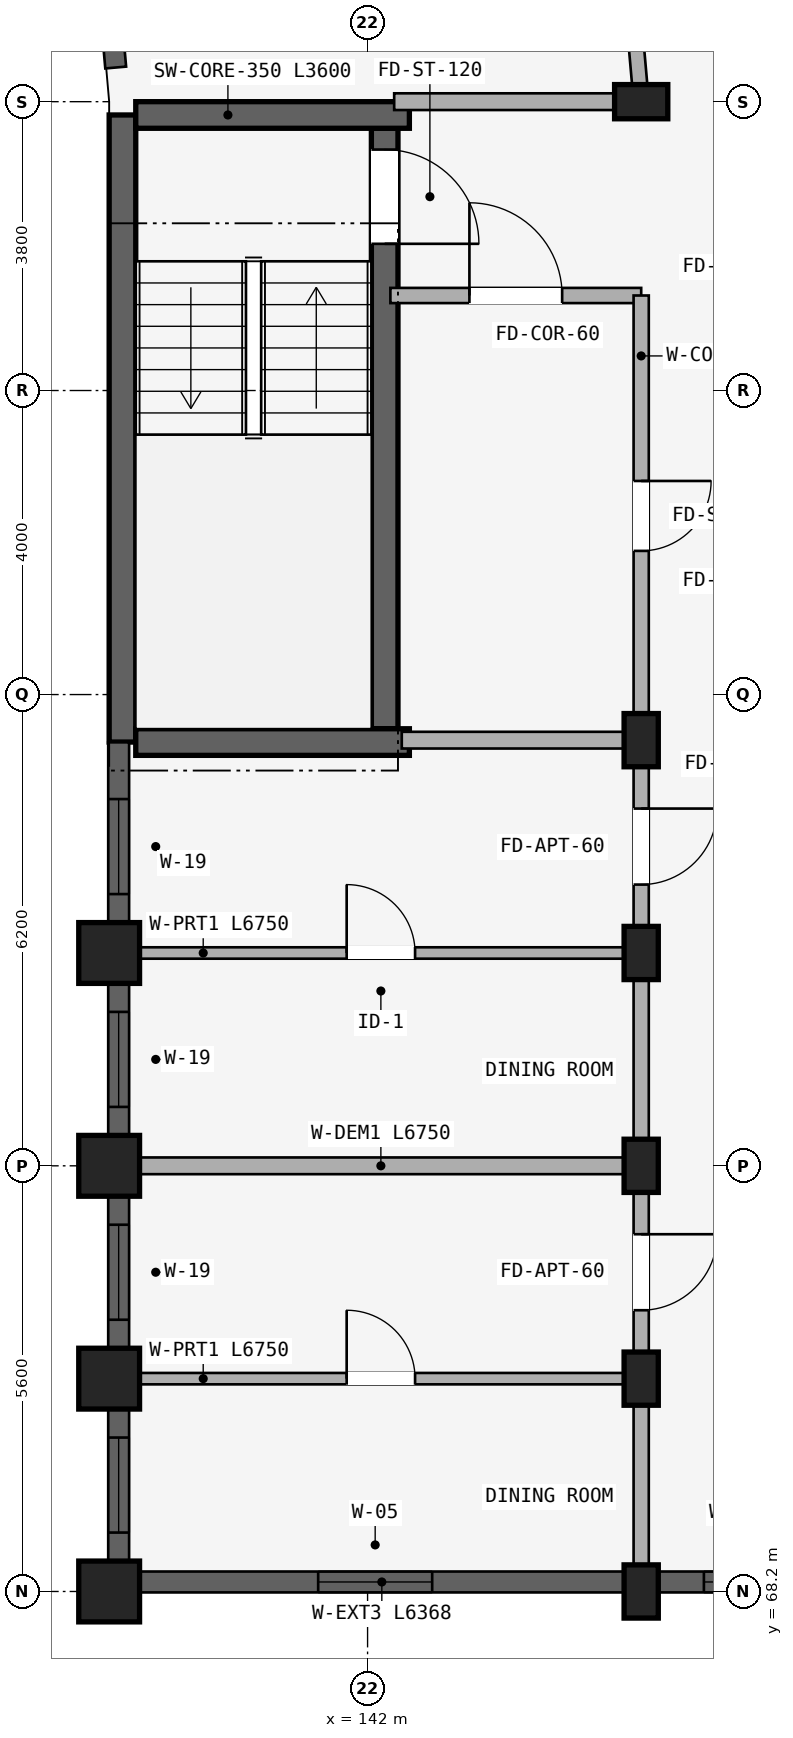
"""IFC4 building model, lengths in metres.
Left out: names, types, materials, properties, quantities, classifications, styles, units other than length and angle.
Written with IfcOpenShell. Run it as: python <this file> out.ifc"""

import sys

from ifc_helpers import new_model, si_unit, direction, frame, frame_2d, origin, origin_2d, place, context, subcontext, project, spatial, rectangle, extrude, element, fill, save


model = new_model("IFC4")
c1 = context("Model", 3, precision=1e-05, world=origin(), true_north=direction((0.0, 1.0)))
c2 = subcontext(c1, "Body", "Model", "MODEL_VIEW")
j1 = project(units=[si_unit("LENGTHUNIT", "METRE"), si_unit("PLANEANGLEUNIT", "RADIAN")], contexts=[c1])
p1 = place(None, origin())
s1 = spatial("IfcSite", under=j1, at=p1, CompositionType="ELEMENT")
p2 = place(p1, origin())
s2 = spatial("IfcBuilding", under=s1, at=p2, CompositionType="ELEMENT")
p3 = place(p2, frame((0.0, 0.0, 11.85)))
s3 = spatial("IfcBuildingStorey", under=s2, at=p3, CompositionType="ELEMENT", Elevation=11.85)
p4 = place(p3, frame((138.775, 87.625, 0.0), z_axis=(0.0, 0.0, 1.0), x_axis=(0.0, -1.0, 0.0)))
e1 = element("IfcWall", 1, at=p4, inside=s3, PredefinedType="SHEAR", context=c2, shape_type="SweptSolid", body=[
    extrude(rectangle(XDim=8.25, YDim=0.35, at=frame_2d((4.125, 0.0))), origin(), (0.0, 0.0, 1.0), 2.93),
])
p5 = place(p3, frame((142.225, 87.45, 0.0), z_axis=(0.0, 0.0, 1.0), x_axis=(0.0, -1.0, 0.0)))
e2 = element("IfcWall", 2, at=p5, inside=s3, PredefinedType="SHEAR", context=c2, shape_type="SweptSolid", body=[
    extrude(rectangle(XDim=7.9, YDim=0.35, at=frame_2d((3.95, 0.0))), origin(), (0.0, 0.0, 1.0), 2.93),
])
p6 = place(p5, frame((0.28, 0.0, 0.0)))
e3 = element("IfcOpeningElement", 3, at=p6, cuts=e2, PredefinedType="OPENING", context=c2, shape_type="SweptSolid", body=[
    extrude(rectangle(XDim=1.24, YDim=2.15, at=frame_2d((0.62, 1.075))), frame((0.0, 0.185, 0.0), z_axis=(0.0, -1.0, 0.0), x_axis=(1.0, 0.0, 0.0)), (0.0, 0.0, 1.0), 0.37),
])
for number, where, z_axis, x_axis in (
    (4, (138.95, 87.625, 0.0), (0.0, 0.0, 1.0), (1.0, 0.0, 0.0)),
    (5, (138.95, 79.375, 0.0), (0.0, 0.0, 1.0), (1.0, 0.0, 0.0)),
):
    element("IfcWall", number, at=place(p3, frame(where, z_axis=z_axis, x_axis=x_axis)), inside=s3, PredefinedType="SHEAR", context=c2, shape_type="SweptSolid", body=[
        extrude(rectangle(XDim=3.6, YDim=0.35, at=frame_2d((1.8, 0.0))), origin(), (0.0, 0.0, 1.0), 2.93),
    ])
for number, where, z_axis, x_axis in (
    (6, (145.6, 87.8, 0.0), (0.0, 0.0, 1.0), (0.0, 1.0, 0.0)),
    (7, (145.6, 79.4, 0.0), (0.0, 0.0, 1.0), (1.0, 0.0, 0.0)),
):
    element("IfcColumn", number, at=place(p3, frame(where, z_axis=z_axis, x_axis=x_axis)), inside=s3, PredefinedType="COLUMN", context=c2, shape_type="SweptSolid", body=[
        extrude(rectangle(XDim=0.45, YDim=0.7, at=origin_2d()), origin(), (0.0, 0.0, 1.0), 2.93),
    ])
p7 = place(p3, frame((138.6, 76.6, 0.0), z_axis=(0.0, 0.0, 1.0), x_axis=(1.0, 0.0, 0.0)))
e8 = element("IfcColumn", 8, at=p7, inside=s3, PredefinedType="COLUMN", context=c2, shape_type="SweptSolid", body=[
    extrude(rectangle(XDim=0.8, YDim=0.8, at=origin_2d()), origin(), (0.0, 0.0, 1.0), 2.93),
])
p8 = place(p3, frame((145.6, 76.6, 0.0), z_axis=(0.0, 0.0, 1.0), x_axis=(1.0, 0.0, 0.0)))
e9 = element("IfcColumn", 9, at=p8, inside=s3, PredefinedType="COLUMN", context=c2, shape_type="SweptSolid", body=[
    extrude(rectangle(XDim=0.45, YDim=0.7, at=origin_2d()), origin(), (0.0, 0.0, 1.0), 2.93),
])
p9 = place(p3, frame((138.6, 73.8, 0.0), z_axis=(0.0, 0.0, 1.0), x_axis=(1.0, 0.0, 0.0)))
e10 = element("IfcColumn", 10, at=p9, inside=s3, PredefinedType="COLUMN", context=c2, shape_type="SweptSolid", body=[
    extrude(rectangle(XDim=0.8, YDim=0.8, at=origin_2d()), origin(), (0.0, 0.0, 1.0), 2.93),
])
p10 = place(p3, frame((145.6, 73.8, 0.0), z_axis=(0.0, 0.0, 1.0), x_axis=(1.0, 0.0, 0.0)))
e11 = element("IfcColumn", 11, at=p10, inside=s3, PredefinedType="COLUMN", context=c2, shape_type="SweptSolid", body=[
    extrude(rectangle(XDim=0.45, YDim=0.7, at=origin_2d()), origin(), (0.0, 0.0, 1.0), 2.93),
])
p11 = place(p3, frame((138.6, 71.0, 0.0), z_axis=(0.0, 0.0, 1.0), x_axis=(1.0, 0.0, 0.0)))
e12 = element("IfcColumn", 12, at=p11, inside=s3, PredefinedType="COLUMN", context=c2, shape_type="SweptSolid", body=[
    extrude(rectangle(XDim=0.8, YDim=0.8, at=origin_2d()), origin(), (0.0, 0.0, 1.0), 2.93),
])
p12 = place(p3, frame((145.6, 71.0, 0.0), z_axis=(0.0, 0.0, 1.0), x_axis=(1.0, 0.0, 0.0)))
e13 = element("IfcColumn", 13, at=p12, inside=s3, PredefinedType="COLUMN", context=c2, shape_type="SweptSolid", body=[
    extrude(rectangle(XDim=0.45, YDim=0.7, at=origin_2d()), origin(), (0.0, 0.0, 1.0), 2.93),
])
p13 = place(p3, frame((138.6, 68.2, 0.0), z_axis=(0.0, 0.0, 1.0), x_axis=(1.0, 0.0, 0.0)))
e14 = element("IfcColumn", 14, at=p13, inside=s3, PredefinedType="COLUMN", context=c2, shape_type="SweptSolid", body=[
    extrude(rectangle(XDim=0.8, YDim=0.8, at=origin_2d()), origin(), (0.0, 0.0, 1.0), 2.93),
])
p14 = place(p3, frame((145.6, 68.2, 0.0), z_axis=(0.0, 0.0, 1.0), x_axis=(1.0, 0.0, 0.0)))
e15 = element("IfcColumn", 15, at=p14, inside=s3, PredefinedType="COLUMN", context=c2, shape_type="SweptSolid", body=[
    extrude(rectangle(XDim=0.45, YDim=0.7, at=origin_2d()), origin(), (0.0, 0.0, 1.0), 2.93),
])
p15 = place(p3, frame((142.3, 85.25, 0.0), z_axis=(0.0, 0.0, 1.0), x_axis=(1.0, 0.0, 0.0)))
e16 = element("IfcWall", 16, at=p15, inside=s3, PredefinedType="STANDARD", context=c2, shape_type="SweptSolid", body=[
    extrude(rectangle(XDim=3.3, YDim=0.2, at=frame_2d((1.65, 0.0))), origin(), (0.0, 0.0, 1.0), 2.372),
])
p16 = place(p15, frame((1.04, 0.0, 0.0)))
e17 = element("IfcOpeningElement", 17, at=p16, cuts=e16, PredefinedType="OPENING", context=c2, shape_type="SweptSolid", body=[
    extrude(rectangle(XDim=1.22, YDim=2.15, at=frame_2d((0.61, 1.075))), frame((0.0, 0.11, 0.0), z_axis=(0.0, -1.0, 0.0), x_axis=(1.0, 0.0, 0.0)), (0.0, 0.0, 1.0), 0.22),
])
p17 = place(p3, frame((145.6, 85.25, 0.0), z_axis=(0.0, 0.0, 1.0), x_axis=(0.0, -1.0, 0.0)))
e18 = element("IfcWall", 18, at=p17, inside=s3, PredefinedType="STANDARD", context=c2, shape_type="SweptSolid", body=[
    extrude(rectangle(XDim=5.8, YDim=0.2, at=frame_2d((2.9, 0.0))), origin(), (0.0, 0.0, 1.0), 2.372),
])
p18 = place(p17, frame((2.44, 0.0, 0.0)))
e19 = element("IfcOpeningElement", 19, at=p18, cuts=e18, PredefinedType="OPENING", context=c2, shape_type="SweptSolid", body=[
    extrude(rectangle(XDim=0.92, YDim=2.1, at=frame_2d((0.46, 1.05))), frame((0.0, 0.11, 0.0), z_axis=(0.0, -1.0, 0.0), x_axis=(1.0, 0.0, 0.0)), (0.0, 0.0, 1.0), 0.22),
])
p19 = place(p3, frame((145.208, 92.28, 0.0), z_axis=(0.0, 0.0, 1.0), x_axis=(0.087187153726, -0.996191949488, 0.0)))
e20 = element("IfcWall", 20, at=p19, inside=s3, PredefinedType="STANDARD", context=c2, shape_type="SweptSolid", body=[
    extrude(rectangle(XDim=4.497, YDim=0.2, at=frame_2d((2.249, 0.0))), origin(), (0.0, 0.0, 1.0), 2.372),
])
p20 = place(p3, frame((142.35, 87.8, 0.0), z_axis=(0.0, 0.0, 1.0), x_axis=(1.0, 0.0, 0.0)))
e21 = element("IfcWall", 21, at=p20, inside=s3, PredefinedType="STANDARD", context=c2, shape_type="SweptSolid", body=[
    extrude(rectangle(XDim=3.2, YDim=0.22, at=frame_2d((1.6, 0.0))), origin(), (0.0, 0.0, 1.0), 2.372),
])
p21 = place(p3, frame((145.6, 79.4, 0.0), z_axis=(0.0, 0.0, 1.0), x_axis=(0.0, -1.0, 0.0)))
e22 = element("IfcWall", 22, at=p21, inside=s3, PredefinedType="STANDARD", context=c2, shape_type="SweptSolid", body=[
    extrude(rectangle(XDim=2.8, YDim=0.2, at=frame_2d((1.4, 0.0))), origin(), (0.0, 0.0, 1.0), 2.372),
])
p22 = place(p21, frame((0.9, 0.0, 0.0)))
e23 = element("IfcOpeningElement", 23, at=p22, cuts=e22, PredefinedType="OPENING", context=c2, shape_type="SweptSolid", body=[
    extrude(rectangle(XDim=1.0, YDim=2.15, at=frame_2d((0.5, 1.075))), frame((0.0, 0.11, 0.0), z_axis=(0.0, -1.0, 0.0), x_axis=(1.0, 0.0, 0.0)), (0.0, 0.0, 1.0), 0.22),
])
p23 = place(p3, frame((142.45, 79.4, 0.0), z_axis=(0.0, 0.0, 1.0), x_axis=(1.0, 0.0, 0.0)))
e24 = element("IfcWall", 24, at=p23, inside=s3, PredefinedType="STANDARD", context=c2, shape_type="SweptSolid", body=[
    extrude(rectangle(XDim=3.1, YDim=0.22, at=frame_2d((1.55, 0.0))), origin(), (0.0, 0.0, 1.0), 2.372),
])
p24 = place(p3, frame((145.6, 76.6, 0.0), z_axis=(0.0, 0.0, 1.0), x_axis=(0.0, -1.0, 0.0)))
e25 = element("IfcWall", 25, at=p24, inside=s3, PredefinedType="STANDARD", context=c2, shape_type="SweptSolid", body=[
    extrude(rectangle(XDim=2.8, YDim=0.2, at=frame_2d((1.4, 0.0))), origin(), (0.0, 0.0, 1.0), 2.372),
])
p25 = place(p3, frame((138.8, 76.6, 0.0), z_axis=(0.0, 0.0, 1.0), x_axis=(1.0, 0.0, 0.0)))
e26 = element("IfcWall", 26, at=p25, inside=s3, PredefinedType="PARTITIONING", context=c2, shape_type="SweptSolid", body=[
    extrude(rectangle(XDim=6.75, YDim=0.15, at=frame_2d((3.375, 0.0))), origin(), (0.0, 0.0, 1.0), 2.372),
])
p26 = place(p25, frame((2.925, 0.0, 0.0)))
e27 = element("IfcOpeningElement", 27, at=p26, cuts=e26, PredefinedType="OPENING", context=c2, shape_type="SweptSolid", body=[
    extrude(rectangle(XDim=0.9, YDim=2.1, at=frame_2d((0.45, 1.05))), frame((0.0, 0.085, 0.0), z_axis=(0.0, -1.0, 0.0), x_axis=(1.0, 0.0, 0.0)), (0.0, 0.0, 1.0), 0.17),
])
p27 = place(p3, frame((145.6, 73.8, 0.0), z_axis=(0.0, 0.0, 1.0), x_axis=(0.0, -1.0, 0.0)))
e28 = element("IfcWall", 28, at=p27, inside=s3, PredefinedType="STANDARD", context=c2, shape_type="SweptSolid", body=[
    extrude(rectangle(XDim=2.8, YDim=0.2, at=frame_2d((1.4, 0.0))), origin(), (0.0, 0.0, 1.0), 2.372),
])
p28 = place(p27, frame((0.9, 0.0, 0.0)))
e29 = element("IfcOpeningElement", 29, at=p28, cuts=e28, PredefinedType="OPENING", context=c2, shape_type="SweptSolid", body=[
    extrude(rectangle(XDim=1.0, YDim=2.15, at=frame_2d((0.5, 1.075))), frame((0.0, 0.11, 0.0), z_axis=(0.0, -1.0, 0.0), x_axis=(1.0, 0.0, 0.0)), (0.0, 0.0, 1.0), 0.22),
])
p29 = place(p3, frame((138.8, 73.8, 0.0), z_axis=(0.0, 0.0, 1.0), x_axis=(1.0, 0.0, 0.0)))
e30 = element("IfcWall", 30, at=p29, inside=s3, PredefinedType="STANDARD", context=c2, shape_type="SweptSolid", body=[
    extrude(rectangle(XDim=6.75, YDim=0.22, at=frame_2d((3.375, 0.0))), origin(), (0.0, 0.0, 1.0), 2.372),
])
p30 = place(p3, frame((145.6, 71.0, 0.0), z_axis=(0.0, 0.0, 1.0), x_axis=(0.0, -1.0, 0.0)))
e31 = element("IfcWall", 31, at=p30, inside=s3, PredefinedType="STANDARD", context=c2, shape_type="SweptSolid", body=[
    extrude(rectangle(XDim=2.8, YDim=0.2, at=frame_2d((1.4, 0.0))), origin(), (0.0, 0.0, 1.0), 2.372),
])
p31 = place(p3, frame((138.8, 71.0, 0.0), z_axis=(0.0, 0.0, 1.0), x_axis=(1.0, 0.0, 0.0)))
e32 = element("IfcWall", 32, at=p31, inside=s3, PredefinedType="PARTITIONING", context=c2, shape_type="SweptSolid", body=[
    extrude(rectangle(XDim=6.75, YDim=0.15, at=frame_2d((3.375, 0.0))), origin(), (0.0, 0.0, 1.0), 2.372),
])
p32 = place(p31, frame((2.925, 0.0, 0.0)))
e33 = element("IfcOpeningElement", 33, at=p32, cuts=e32, PredefinedType="OPENING", context=c2, shape_type="SweptSolid", body=[
    extrude(rectangle(XDim=0.9, YDim=2.1, at=frame_2d((0.45, 1.05))), frame((0.0, 0.085, 0.0), z_axis=(0.0, -1.0, 0.0), x_axis=(1.0, 0.0, 0.0)), (0.0, 0.0, 1.0), 0.17),
])
p33 = place(p3, frame((138.463, 90.797, 0.0), z_axis=(0.0, 0.0, 1.0), x_axis=(0.08716102895, -0.996194235595, 0.0)))
e34 = element("IfcWall", 34, at=p33, inside=s3, PredefinedType="STANDARD", context=c2, shape_type="SweptSolid", body=[
    extrude(rectangle(XDim=2.557, YDim=0.275, at=frame_2d((1.279, 0.0))), origin(), (0.0, 0.0, 1.0), 2.422),
])
p34 = place(p33, frame((0.759, 0.0, 0.722)))
e35 = element("IfcOpeningElement", 35, at=p34, cuts=e34, PredefinedType="OPENING", context=c2, shape_type="SweptSolid", body=[
    extrude(rectangle(XDim=1.2, YDim=1.5, at=frame_2d((0.6, 0.75))), frame((0.0, 0.147, 0.0), z_axis=(0.0, -1.0, 0.0), x_axis=(1.0, 0.0, 0.0)), (0.0, 0.0, 1.0), 0.295),
])
p35 = place(p3, frame((138.725, 79.372, 0.0), z_axis=(0.0, 0.0, 1.0), x_axis=(0.0, -1.0, 0.0)))
e36 = element("IfcWall", 36, at=p35, inside=s3, PredefinedType="STANDARD", context=c2, shape_type="SweptSolid", body=[
    extrude(rectangle(XDim=2.368, YDim=0.275, at=frame_2d((1.184, 0.0))), origin(), (0.0, 0.0, 1.0), 2.472),
])
p36 = place(p35, frame((0.747, 0.0, 0.722)))
e37 = element("IfcOpeningElement", 37, at=p36, cuts=e36, PredefinedType="OPENING", context=c2, shape_type="SweptSolid", body=[
    extrude(rectangle(XDim=1.25, YDim=1.55, at=frame_2d((0.625, 0.775))), frame((0.0, 0.147, 0.0), z_axis=(0.0, -1.0, 0.0), x_axis=(1.0, 0.0, 0.0)), (0.0, 0.0, 1.0), 0.295),
])
p37 = place(p3, frame((138.725, 76.197, 0.0), z_axis=(0.0, 0.0, 1.0), x_axis=(0.0, -1.0, 0.0)))
e38 = element("IfcWall", 38, at=p37, inside=s3, PredefinedType="STANDARD", context=c2, shape_type="SweptSolid", body=[
    extrude(rectangle(XDim=1.993, YDim=0.275, at=frame_2d((0.997, 0.0))), origin(), (0.0, 0.0, 1.0), 2.472),
])
p38 = place(p37, frame((0.372, 0.0, 0.722)))
e39 = element("IfcOpeningElement", 39, at=p38, cuts=e38, PredefinedType="OPENING", context=c2, shape_type="SweptSolid", body=[
    extrude(rectangle(XDim=1.25, YDim=1.55, at=frame_2d((0.625, 0.775))), frame((0.0, 0.147, 0.0), z_axis=(0.0, -1.0, 0.0), x_axis=(1.0, 0.0, 0.0)), (0.0, 0.0, 1.0), 0.295),
])
p39 = place(p3, frame((138.725, 73.396, 0.0), z_axis=(0.0, 0.0, 1.0), x_axis=(0.0, -1.0, 0.0)))
e40 = element("IfcWall", 40, at=p39, inside=s3, PredefinedType="STANDARD", context=c2, shape_type="SweptSolid", body=[
    extrude(rectangle(XDim=1.993, YDim=0.275, at=frame_2d((0.997, 0.0))), origin(), (0.0, 0.0, 1.0), 2.472),
])
p40 = place(p39, frame((0.372, 0.0, 0.722)))
e41 = element("IfcOpeningElement", 41, at=p40, cuts=e40, PredefinedType="OPENING", context=c2, shape_type="SweptSolid", body=[
    extrude(rectangle(XDim=1.25, YDim=1.55, at=frame_2d((0.625, 0.775))), frame((0.0, 0.147, 0.0), z_axis=(0.0, -1.0, 0.0), x_axis=(1.0, 0.0, 0.0)), (0.0, 0.0, 1.0), 0.295),
])
p41 = place(p3, frame((138.725, 70.596, 0.0), z_axis=(0.0, 0.0, 1.0), x_axis=(0.0, -1.0, 0.0)))
e42 = element("IfcWall", 42, at=p41, inside=s3, PredefinedType="STANDARD", context=c2, shape_type="SweptSolid", body=[
    extrude(rectangle(XDim=1.993, YDim=0.275, at=frame_2d((0.997, 0.0))), origin(), (0.0, 0.0, 1.0), 2.472),
])
p42 = place(p41, frame((0.372, 0.0, 0.722)))
e43 = element("IfcOpeningElement", 43, at=p42, cuts=e42, PredefinedType="OPENING", context=c2, shape_type="SweptSolid", body=[
    extrude(rectangle(XDim=1.25, YDim=1.55, at=frame_2d((0.625, 0.775))), frame((0.0, 0.147, 0.0), z_axis=(0.0, -1.0, 0.0), x_axis=(1.0, 0.0, 0.0)), (0.0, 0.0, 1.0), 0.295),
])
p43 = place(p3, frame((139.003, 68.325, 0.0), z_axis=(0.0, 0.0, 1.0), x_axis=(1.0, 0.0, 0.0)))
e44 = element("IfcWall", 44, at=p43, inside=s3, PredefinedType="STANDARD", context=c2, shape_type="SweptSolid", body=[
    extrude(rectangle(XDim=6.368, YDim=0.275, at=frame_2d((3.184, 0.0))), origin(), (0.0, 0.0, 1.0), 2.372),
])
p44 = place(p43, frame((2.346, 0.0, 0.522)))
e45 = element("IfcOpeningElement", 45, at=p44, cuts=e44, PredefinedType="OPENING", context=c2, shape_type="SweptSolid", body=[
    extrude(rectangle(XDim=1.5, YDim=1.65, at=frame_2d((0.75, 0.825))), frame((0.0, 0.147, 0.0), z_axis=(0.0, -1.0, 0.0), x_axis=(1.0, 0.0, 0.0)), (0.0, 0.0, 1.0), 0.295),
])
p45 = place(p3, frame((145.829, 68.325, 0.0), z_axis=(0.0, 0.0, 1.0), x_axis=(1.0, 0.0, 0.0)))
e46 = element("IfcWall", 46, at=p45, inside=s3, PredefinedType="STANDARD", context=c2, shape_type="SweptSolid", body=[
    extrude(rectangle(XDim=1.943, YDim=0.275, at=frame_2d((0.971, 0.0))), origin(), (0.0, 0.0, 1.0), 2.372),
])
p46 = place(p45, frame((0.596, 0.0, 0.88)))
e47 = element("IfcOpeningElement", 47, at=p46, cuts=e46, PredefinedType="OPENING", context=c2, shape_type="SweptSolid", body=[
    extrude(rectangle(XDim=0.75, YDim=1.05, at=frame_2d((0.375, 0.525))), frame((0.0, 0.147, 0.0), z_axis=(0.0, -1.0, 0.0), x_axis=(1.0, 0.0, 0.0)), (0.0, 0.0, 1.0), 0.295),
])
p47 = place(p36, origin())
e48 = element("IfcWindow", 48, at=p47, inside=s3, PartitioningType="SINGLE_PANEL", PredefinedType="WINDOW", context=c2, shape_type="SweptSolid", body=[
    extrude(rectangle(XDim=1.25, YDim=1.55, at=frame_2d((0.625, 0.775))), frame((0.0, 0.03, 0.0), z_axis=(0.0, -1.0, 0.0), x_axis=(1.0, 0.0, 0.0)), (0.0, 0.0, 1.0), 0.06),
])
fill(e37, e48)
p48 = place(p38, origin())
e49 = element("IfcWindow", 49, at=p48, inside=s3, PartitioningType="SINGLE_PANEL", PredefinedType="WINDOW", context=c2, shape_type="SweptSolid", body=[
    extrude(rectangle(XDim=1.25, YDim=1.55, at=frame_2d((0.625, 0.775))), frame((0.0, 0.03, 0.0), z_axis=(0.0, -1.0, 0.0), x_axis=(1.0, 0.0, 0.0)), (0.0, 0.0, 1.0), 0.06),
])
fill(e39, e49)
p49 = place(p40, origin())
e50 = element("IfcWindow", 50, at=p49, inside=s3, PartitioningType="SINGLE_PANEL", PredefinedType="WINDOW", context=c2, shape_type="SweptSolid", body=[
    extrude(rectangle(XDim=1.25, YDim=1.55, at=frame_2d((0.625, 0.775))), frame((0.0, 0.03, 0.0), z_axis=(0.0, -1.0, 0.0), x_axis=(1.0, 0.0, 0.0)), (0.0, 0.0, 1.0), 0.06),
])
fill(e41, e50)
p50 = place(p42, origin())
e51 = element("IfcWindow", 51, at=p50, inside=s3, PartitioningType="SINGLE_PANEL", PredefinedType="WINDOW", context=c2, shape_type="SweptSolid", body=[
    extrude(rectangle(XDim=1.25, YDim=1.55, at=frame_2d((0.625, 0.775))), frame((0.0, 0.03, 0.0), z_axis=(0.0, -1.0, 0.0), x_axis=(1.0, 0.0, 0.0)), (0.0, 0.0, 1.0), 0.06),
])
fill(e43, e51)
p51 = place(p44, origin())
e52 = element("IfcWindow", 52, at=p51, inside=s3, PartitioningType="DOUBLE_PANEL_VERTICAL", PredefinedType="WINDOW", context=c2, shape_type="SweptSolid", body=[
    extrude(rectangle(XDim=1.5, YDim=1.65, at=frame_2d((0.75, 0.825))), frame((0.0, 0.03, 0.0), z_axis=(0.0, -1.0, 0.0), x_axis=(1.0, 0.0, 0.0)), (0.0, 0.0, 1.0), 0.06),
])
fill(e45, e52)
p52 = place(p46, origin())
e53 = element("IfcWindow", 53, at=p52, inside=s3, PartitioningType="SINGLE_PANEL", PredefinedType="WINDOW", context=c2, shape_type="SweptSolid", body=[
    extrude(rectangle(XDim=0.75, YDim=1.05, at=frame_2d((0.375, 0.525))), frame((0.0, 0.03, 0.0), z_axis=(0.0, -1.0, 0.0), x_axis=(1.0, 0.0, 0.0)), (0.0, 0.0, 1.0), 0.06),
])
fill(e47, e53)
p53 = place(p6, frame((1.24, 0.0, 0.0), z_axis=(0.0, 0.0, 1.0), x_axis=(-1.0, 0.0, 0.0)))
e54 = element("IfcDoor", 54, at=p53, inside=s3, OperationType="SINGLE_SWING_LEFT", PredefinedType="DOOR", context=c2, shape_type="SweptSolid", body=[
    extrude(rectangle(XDim=1.24, YDim=2.15, at=frame_2d((0.62, 1.075))), frame((0.0, 0.025, 0.0), z_axis=(0.0, -1.0, 0.0), x_axis=(1.0, 0.0, 0.0)), (0.0, 0.0, 1.0), 0.05),
])
fill(e3, e54)
p54 = place(p16, origin())
e55 = element("IfcDoor", 55, at=p54, inside=s3, OperationType="SINGLE_SWING_LEFT", PredefinedType="DOOR", context=c2, shape_type="SweptSolid", body=[
    extrude(rectangle(XDim=1.22, YDim=2.15, at=frame_2d((0.61, 1.075))), frame((0.0, 0.025, 0.0), z_axis=(0.0, -1.0, 0.0), x_axis=(1.0, 0.0, 0.0)), (0.0, 0.0, 1.0), 0.05),
])
fill(e17, e55)
p55 = place(p18, frame((0.92, 0.0, 0.0), z_axis=(0.0, 0.0, 1.0), x_axis=(-1.0, 0.0, 0.0)))
e56 = element("IfcDoor", 56, at=p55, inside=s3, OperationType="SINGLE_SWING_RIGHT", PredefinedType="DOOR", context=c2, shape_type="SweptSolid", body=[
    extrude(rectangle(XDim=0.92, YDim=2.1, at=frame_2d((0.46, 1.05))), frame((0.0, 0.025, 0.0), z_axis=(0.0, -1.0, 0.0), x_axis=(1.0, 0.0, 0.0)), (0.0, 0.0, 1.0), 0.05),
])
fill(e19, e56)
p56 = place(p22, origin())
e57 = element("IfcDoor", 57, at=p56, inside=s3, OperationType="SINGLE_SWING_LEFT", PredefinedType="DOOR", context=c2, shape_type="SweptSolid", body=[
    extrude(rectangle(XDim=1.0, YDim=2.15, at=frame_2d((0.5, 1.075))), frame((0.0, 0.025, 0.0), z_axis=(0.0, -1.0, 0.0), x_axis=(1.0, 0.0, 0.0)), (0.0, 0.0, 1.0), 0.05),
])
fill(e23, e57)
p57 = place(p26, origin())
e58 = element("IfcDoor", 58, at=p57, inside=s3, OperationType="SINGLE_SWING_LEFT", PredefinedType="DOOR", context=c2, shape_type="SweptSolid", body=[
    extrude(rectangle(XDim=0.9, YDim=2.1, at=frame_2d((0.45, 1.05))), frame((0.0, 0.025, 0.0), z_axis=(0.0, -1.0, 0.0), x_axis=(1.0, 0.0, 0.0)), (0.0, 0.0, 1.0), 0.05),
])
fill(e27, e58)
p58 = place(p28, origin())
e59 = element("IfcDoor", 59, at=p58, inside=s3, OperationType="SINGLE_SWING_LEFT", PredefinedType="DOOR", context=c2, shape_type="SweptSolid", body=[
    extrude(rectangle(XDim=1.0, YDim=2.15, at=frame_2d((0.5, 1.075))), frame((0.0, 0.025, 0.0), z_axis=(0.0, -1.0, 0.0), x_axis=(1.0, 0.0, 0.0)), (0.0, 0.0, 1.0), 0.05),
])
fill(e29, e59)
p59 = place(p32, origin())
e60 = element("IfcDoor", 60, at=p59, inside=s3, OperationType="SINGLE_SWING_LEFT", PredefinedType="DOOR", context=c2, shape_type="SweptSolid", body=[
    extrude(rectangle(XDim=0.9, YDim=2.1, at=frame_2d((0.45, 1.05))), frame((0.0, 0.025, 0.0), z_axis=(0.0, -1.0, 0.0), x_axis=(1.0, 0.0, 0.0)), (0.0, 0.0, 1.0), 0.05),
])
fill(e33, e60)
save(model, sys.argv[1])
